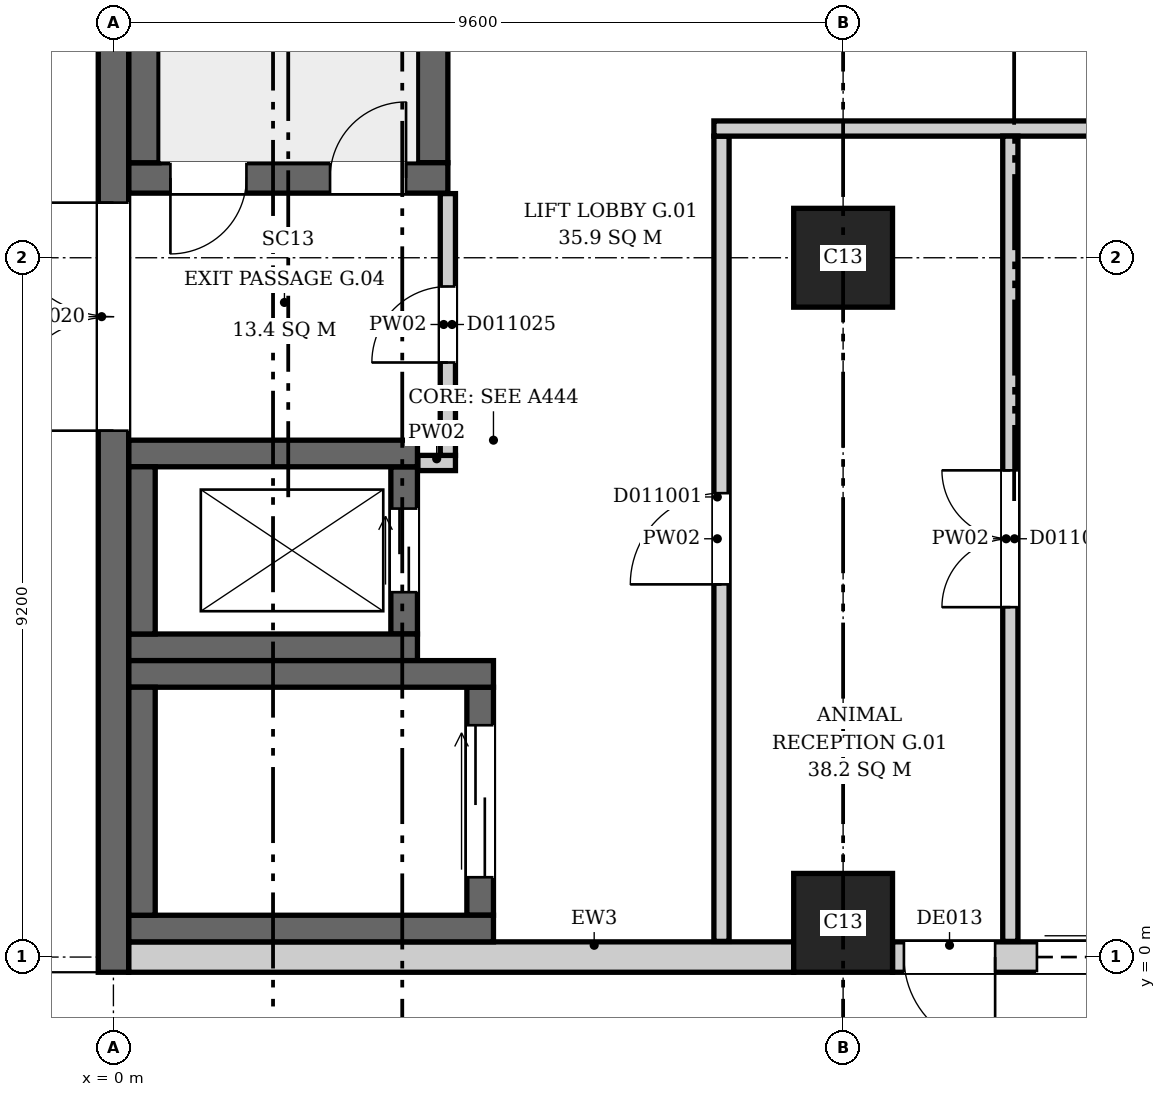
"""IFC4 building model, lengths in metres.
Left out: names, types, materials, properties, quantities, classifications, styles, units other than length and angle.
Written with IfcOpenShell. Run it as: python <this file> out.ifc"""

import sys

from ifc_helpers import new_model, si_unit, direction, frame, frame_2d, origin, origin_2d, place, context, subcontext, project, spatial, rectangle, extrude, element, fill, save


model = new_model("IFC4")
c1 = context("Model", 3, precision=1e-05, world=origin(), true_north=direction((0.0, 1.0)))
c2 = subcontext(c1, "Body", "Model", "MODEL_VIEW")
j1 = project(units=[si_unit("LENGTHUNIT", "METRE"), si_unit("PLANEANGLEUNIT", "RADIAN")], contexts=[c1])
p1 = place(None, origin())
s1 = spatial("IfcSite", under=j1, at=p1, CompositionType="ELEMENT")
p2 = place(p1, origin())
s2 = spatial("IfcBuilding", under=s1, at=p2, CompositionType="ELEMENT")
p3 = place(p2, origin())
s3 = spatial("IfcBuildingStorey", under=s2, at=p3, CompositionType="ELEMENT", Elevation=0.0)
p4 = place(p3, frame((0.0, -0.2, 0.0), z_axis=(0.0, 0.0, 1.0), x_axis=(0.0, 1.0, 0.0)))
e1 = element("IfcWall", 1, at=p4, inside=s3, PredefinedType="SHEAR", context=c2, shape_type="SweptSolid", body=[
    extrude(rectangle(XDim=46.88, YDim=0.4, at=frame_2d((23.44, 0.0))), origin(), (0.0, 0.0, 1.0), 6.5),
])
p5 = place(p4, frame((7.125, 0.0, 0.0)))
e2 = element("IfcOpeningElement", 2, at=p5, cuts=e1, PredefinedType="OPENING", context=c2, shape_type="SweptSolid", body=[
    extrude(rectangle(XDim=3.0, YDim=2.4, at=frame_2d((1.5, 1.2))), frame((0.0, 0.21, 0.0), z_axis=(0.0, -1.0, 0.0), x_axis=(1.0, 0.0, 0.0)), (0.0, 0.0, 1.0), 0.42),
])
p6 = place(p4, frame((38.2, 0.0, 0.0)))
e3 = element("IfcOpeningElement", 3, at=p6, cuts=e1, PredefinedType="OPENING", context=c2, shape_type="SweptSolid", body=[
    extrude(rectangle(XDim=3.0, YDim=2.4, at=frame_2d((1.5, 1.2))), frame((0.0, 0.21, 0.0), z_axis=(0.0, -1.0, 0.0), x_axis=(1.0, 0.0, 0.0)), (0.0, 0.0, 1.0), 0.42),
])
p7 = place(p3, frame((0.2, 10.25, 0.0), z_axis=(0.0, 0.0, 1.0), x_axis=(1.0, 0.0, 0.0)))
e4 = element("IfcWall", 4, at=p7, inside=s3, PredefinedType="SHEAR", context=c2, shape_type="SweptSolid", body=[
    extrude(rectangle(XDim=4.2, YDim=0.4, at=frame_2d((2.1, 0.0))), origin(), (0.0, 0.0, 1.0), 6.5),
])
p8 = place(p7, frame((0.55, 0.0, 0.0)))
e5 = element("IfcOpeningElement", 5, at=p8, cuts=e4, PredefinedType="OPENING", context=c2, shape_type="SweptSolid", body=[
    extrude(rectangle(XDim=1.0, YDim=2.1, at=frame_2d((0.5, 1.05))), frame((0.0, 0.21, 0.0), z_axis=(0.0, -1.0, 0.0), x_axis=(1.0, 0.0, 0.0)), (0.0, 0.0, 1.0), 0.42),
])
p9 = place(p7, frame((2.65, 0.0, 0.0)))
e6 = element("IfcOpeningElement", 6, at=p9, cuts=e4, PredefinedType="OPENING", context=c2, shape_type="SweptSolid", body=[
    extrude(rectangle(XDim=1.0, YDim=2.1, at=frame_2d((0.5, 1.05))), frame((0.0, 0.21, 0.0), z_axis=(0.0, -1.0, 0.0), x_axis=(1.0, 0.0, 0.0)), (0.0, 0.0, 1.0), 0.42),
])
for number, where, z_axis, x_axis in (
    (7, (0.4, 10.45, 0.0), (0.0, 0.0, 1.0), (0.0, 1.0, 0.0)),
    (8, (4.2, 10.45, 0.0), (0.0, 0.0, 1.0), (0.0, 1.0, 0.0)),
):
    element("IfcWall", number, at=place(p3, frame(where, z_axis=z_axis, x_axis=x_axis)), inside=s3, PredefinedType="SHEAR", context=c2, shape_type="SweptSolid", body=[
        extrude(rectangle(XDim=6.6, YDim=0.4, at=frame_2d((3.3, 0.0))), origin(), (0.0, 0.0, 1.0), 6.5),
    ])
for number, where, z_axis, x_axis in (
    (9, (0.2, 0.375, 0.0), (0.0, 0.0, 1.0), (1.0, 0.0, 0.0)),
    (10, (0.2, 3.725, 0.0), (0.0, 0.0, 1.0), (1.0, 0.0, 0.0)),
):
    element("IfcWall", number, at=place(p3, frame(where, z_axis=z_axis, x_axis=x_axis)), inside=s3, PredefinedType="SHEAR", context=c2, shape_type="SweptSolid", body=[
        extrude(rectangle(XDim=4.8, YDim=0.35, at=frame_2d((2.4, 0.0))), origin(), (0.0, 0.0, 1.0), 6.5),
    ])
p10 = place(p3, frame((0.375, 0.55, 0.0), z_axis=(0.0, 0.0, 1.0), x_axis=(0.0, 1.0, 0.0)))
e11 = element("IfcWall", 11, at=p10, inside=s3, PredefinedType="SHEAR", context=c2, shape_type="SweptSolid", body=[
    extrude(rectangle(XDim=3.0, YDim=0.35, at=frame_2d((1.5, 0.0))), origin(), (0.0, 0.0, 1.0), 6.5),
])
p11 = place(p3, frame((4.825, 0.55, 0.0), z_axis=(0.0, 0.0, 1.0), x_axis=(0.0, 1.0, 0.0)))
e12 = element("IfcWall", 12, at=p11, inside=s3, PredefinedType="SHEAR", context=c2, shape_type="SweptSolid", body=[
    extrude(rectangle(XDim=3.0, YDim=0.35, at=frame_2d((1.5, 0.0))), origin(), (0.0, 0.0, 1.0), 6.5),
])
p12 = place(p11, frame((0.5, 0.0, 0.0)))
e13 = element("IfcOpeningElement", 13, at=p12, cuts=e12, PredefinedType="OPENING", context=c2, shape_type="SweptSolid", body=[
    extrude(rectangle(XDim=2.0, YDim=2.4, at=frame_2d((1.0, 1.2))), frame((0.0, 0.185, 0.0), z_axis=(0.0, -1.0, 0.0), x_axis=(1.0, 0.0, 0.0)), (0.0, 0.0, 1.0), 0.37),
])
for number, where, z_axis, x_axis in (
    (14, (0.2, 4.075, 0.0), (0.0, 0.0, 1.0), (1.0, 0.0, 0.0)),
    (15, (0.2, 6.625, 0.0), (0.0, 0.0, 1.0), (1.0, 0.0, 0.0)),
):
    element("IfcWall", number, at=place(p3, frame(where, z_axis=z_axis, x_axis=x_axis)), inside=s3, PredefinedType="SHEAR", context=c2, shape_type="SweptSolid", body=[
        extrude(rectangle(XDim=3.8, YDim=0.35, at=frame_2d((1.9, 0.0))), origin(), (0.0, 0.0, 1.0), 6.5),
    ])
p13 = place(p3, frame((0.375, 4.25, 0.0), z_axis=(0.0, 0.0, 1.0), x_axis=(0.0, 1.0, 0.0)))
e16 = element("IfcWall", 16, at=p13, inside=s3, PredefinedType="SHEAR", context=c2, shape_type="SweptSolid", body=[
    extrude(rectangle(XDim=2.2, YDim=0.35, at=frame_2d((1.1, 0.0))), origin(), (0.0, 0.0, 1.0), 6.5),
])
p14 = place(p3, frame((3.825, 4.25, 0.0), z_axis=(0.0, 0.0, 1.0), x_axis=(0.0, 1.0, 0.0)))
e17 = element("IfcWall", 17, at=p14, inside=s3, PredefinedType="SHEAR", context=c2, shape_type="SweptSolid", body=[
    extrude(rectangle(XDim=2.2, YDim=0.35, at=frame_2d((1.1, 0.0))), origin(), (0.0, 0.0, 1.0), 6.5),
])
p15 = place(p14, frame((0.55, 0.0, 0.0)))
e18 = element("IfcOpeningElement", 18, at=p15, cuts=e17, PredefinedType="OPENING", context=c2, shape_type="SweptSolid", body=[
    extrude(rectangle(XDim=1.1, YDim=2.1, at=frame_2d((0.55, 1.05))), frame((0.0, 0.185, 0.0), z_axis=(0.0, -1.0, 0.0), x_axis=(1.0, 0.0, 0.0)), (0.0, 0.0, 1.0), 0.37),
])
for number, where, z_axis, x_axis in (
    (19, (9.6, 0.45, 0.0), (0.0, 0.0, 1.0), (1.0, 0.0, 0.0)),
    (20, (9.6, 9.2, 0.0), (0.0, 0.0, 1.0), (1.0, 0.0, 0.0)),
):
    element("IfcColumn", number, at=place(p3, frame(where, z_axis=z_axis, x_axis=x_axis)), inside=s3, PredefinedType="COLUMN", context=c2, shape_type="SweptSolid", body=[
        extrude(rectangle(XDim=1.3, YDim=1.3, at=origin_2d()), origin(), (0.0, 0.0, 1.0), 6.5),
    ])
p16 = place(p3, frame((0.2, 0.0, 0.0), z_axis=(0.0, 0.0, 1.0), x_axis=(1.0, 0.0, 0.0)))
e21 = element("IfcWall", 21, at=p16, inside=s3, PredefinedType="ELEMENTEDWALL", context=c2, shape_type="SweptSolid", body=[
    extrude(rectangle(XDim=8.75, YDim=0.4, at=frame_2d((4.375, 0.0))), origin(), (0.0, 0.0, 1.0), 6.15),
])
p17 = place(p3, frame((10.25, 0.0, 0.0), z_axis=(0.0, 0.0, 1.0), x_axis=(1.0, 0.0, 0.0)))
e22 = element("IfcWall", 22, at=p17, inside=s3, PredefinedType="ELEMENTEDWALL", context=c2, shape_type="SweptSolid", body=[
    extrude(rectangle(XDim=8.3, YDim=0.4, at=frame_2d((4.15, 0.0))), origin(), (0.0, 0.0, 1.0), 6.15),
])
p18 = place(p17, frame((0.15, 0.0, 0.0)))
e23 = element("IfcOpeningElement", 23, at=p18, cuts=e22, PredefinedType="OPENING", context=c2, shape_type="SweptSolid", body=[
    extrude(rectangle(XDim=1.2, YDim=2.4, at=frame_2d((0.6, 1.2))), frame((0.0, 0.21, 0.0), z_axis=(0.0, -1.0, 0.0), x_axis=(1.0, 0.0, 0.0)), (0.0, 0.0, 1.0), 0.42),
])
p19 = place(p17, frame((1.9, 0.0, 0.0)))
e24 = element("IfcOpeningElement", 24, at=p19, cuts=e22, PredefinedType="OPENING", context=c2, shape_type="SweptSolid", body=[
    extrude(rectangle(XDim=4.5, YDim=4.5, at=frame_2d((2.25, 2.25))), frame((0.0, 0.21, 0.0), z_axis=(0.0, -1.0, 0.0), x_axis=(1.0, 0.0, 0.0)), (0.0, 0.0, 1.0), 0.42),
])
p20 = place(p17, frame((6.9, 0.0, 0.0)))
e25 = element("IfcOpeningElement", 25, at=p20, cuts=e22, PredefinedType="OPENING", context=c2, shape_type="SweptSolid", body=[
    extrude(rectangle(XDim=0.9, YDim=2.1, at=frame_2d((0.45, 1.05))), frame((0.0, 0.21, 0.0), z_axis=(0.0, -1.0, 0.0), x_axis=(1.0, 0.0, 0.0)), (0.0, 0.0, 1.0), 0.42),
])
p21 = place(p3, frame((4.006, 6.5, 0.0), z_axis=(0.0, 0.0, 1.0), x_axis=(1.0, 0.0, 0.0)))
e26 = element("IfcWall", 26, at=p21, inside=s3, PredefinedType="PARTITIONING", context=c2, shape_type="SweptSolid", body=[
    extrude(rectangle(XDim=0.494, YDim=0.2, at=frame_2d((0.247, 0.0))), origin(), (0.0, 0.0, 1.0), 6.15),
])
p22 = place(p3, frame((4.4, 6.6, 0.0), z_axis=(0.0, 0.0, 1.0), x_axis=(0.0, 1.0, 0.0)))
e27 = element("IfcWall", 27, at=p22, inside=s3, PredefinedType="PARTITIONING", context=c2, shape_type="SweptSolid", body=[
    extrude(rectangle(XDim=3.444, YDim=0.2, at=frame_2d((1.722, 0.0))), origin(), (0.0, 0.0, 1.0), 6.15),
])
p23 = place(p22, frame((1.222, 0.0, 0.0)))
e28 = element("IfcOpeningElement", 28, at=p23, cuts=e27, PredefinedType="OPENING", context=c2, shape_type="SweptSolid", body=[
    extrude(rectangle(XDim=1.0, YDim=2.1, at=frame_2d((0.5, 1.05))), frame((0.0, 0.11, 0.0), z_axis=(0.0, -1.0, 0.0), x_axis=(1.0, 0.0, 0.0)), (0.0, 0.0, 1.0), 0.22),
])
p24 = place(p3, frame((8.0, 0.206, 0.0), z_axis=(0.0, 0.0, 1.0), x_axis=(0.0, 1.0, 0.0)))
e29 = element("IfcWall", 29, at=p24, inside=s3, PredefinedType="PARTITIONING", context=c2, shape_type="SweptSolid", body=[
    extrude(rectangle(XDim=10.594, YDim=0.2, at=frame_2d((5.297, 0.0))), origin(), (0.0, 0.0, 1.0), 6.15),
])
p25 = place(p24, frame((4.697, 0.0, 0.0)))
e30 = element("IfcOpeningElement", 30, at=p25, cuts=e29, PredefinedType="OPENING", context=c2, shape_type="SweptSolid", body=[
    extrude(rectangle(XDim=1.2, YDim=2.1, at=frame_2d((0.6, 1.05))), frame((0.0, 0.11, 0.0), z_axis=(0.0, -1.0, 0.0), x_axis=(1.0, 0.0, 0.0)), (0.0, 0.0, 1.0), 0.22),
])
p26 = place(p3, frame((7.9, 10.9, 0.0), z_axis=(0.0, 0.0, 1.0), x_axis=(1.0, 0.0, 0.0)))
e31 = element("IfcWall", 31, at=p26, inside=s3, PredefinedType="PARTITIONING", context=c2, shape_type="SweptSolid", body=[
    extrude(rectangle(XDim=49.494, YDim=0.2, at=frame_2d((24.747, 0.0))), origin(), (0.0, 0.0, 1.0), 6.15),
])
p27 = place(p26, frame((41.3, 0.0, 0.0)))
e32 = element("IfcOpeningElement", 32, at=p27, cuts=e31, PredefinedType="OPENING", context=c2, shape_type="SweptSolid", body=[
    extrude(rectangle(XDim=1.2, YDim=2.1, at=frame_2d((0.6, 1.05))), frame((0.0, 0.11, 0.0), z_axis=(0.0, -1.0, 0.0), x_axis=(1.0, 0.0, 0.0)), (0.0, 0.0, 1.0), 0.22),
])
p28 = place(p3, frame((11.8, 0.206, 0.0), z_axis=(0.0, 0.0, 1.0), x_axis=(0.0, 1.0, 0.0)))
e33 = element("IfcWall", 33, at=p28, inside=s3, PredefinedType="PARTITIONING", context=c2, shape_type="SweptSolid", body=[
    extrude(rectangle(XDim=10.594, YDim=0.2, at=frame_2d((5.297, 0.0))), origin(), (0.0, 0.0, 1.0), 6.15),
])
p29 = place(p28, frame((4.397, 0.0, 0.0)))
e34 = element("IfcOpeningElement", 34, at=p29, cuts=e33, PredefinedType="OPENING", context=c2, shape_type="SweptSolid", body=[
    extrude(rectangle(XDim=1.8, YDim=2.1, at=frame_2d((0.9, 1.05))), frame((0.0, 0.11, 0.0), z_axis=(0.0, -1.0, 0.0), x_axis=(1.0, 0.0, 0.0)), (0.0, 0.0, 1.0), 0.22),
])
p30 = place(p18, frame((1.2, 0.0, 0.0), z_axis=(0.0, 0.0, 1.0), x_axis=(-1.0, 0.0, 0.0)))
e35 = element("IfcDoor", 35, at=p30, inside=s3, OperationType="SINGLE_SWING_RIGHT", PredefinedType="DOOR", context=c2, shape_type="SweptSolid", body=[
    extrude(rectangle(XDim=1.2, YDim=2.4, at=frame_2d((0.6, 1.2))), frame((0.0, 0.025, 0.0), z_axis=(0.0, -1.0, 0.0), x_axis=(1.0, 0.0, 0.0)), (0.0, 0.0, 1.0), 0.05),
])
fill(e23, e35)
p31 = place(p19, frame((4.5, 0.0, 0.0), z_axis=(0.0, 0.0, 1.0), x_axis=(-1.0, 0.0, 0.0)))
e36 = element("IfcDoor", 36, at=p31, inside=s3, OperationType="ROLLINGUP", PredefinedType="GATE", context=c2, shape_type="SweptSolid", body=[
    extrude(rectangle(XDim=4.5, YDim=4.5, at=frame_2d((2.25, 2.25))), frame((0.0, 0.025, 0.0), z_axis=(0.0, -1.0, 0.0), x_axis=(1.0, 0.0, 0.0)), (0.0, 0.0, 1.0), 0.05),
])
fill(e24, e36)
p32 = place(p5, origin())
e37 = element("IfcDoor", 37, at=p32, inside=s3, OperationType="DOUBLE_DOOR_SINGLE_SWING", PredefinedType="DOOR", context=c2, shape_type="SweptSolid", body=[
    extrude(rectangle(XDim=3.0, YDim=2.4, at=frame_2d((1.5, 1.2))), frame((0.0, 0.025, 0.0), z_axis=(0.0, -1.0, 0.0), x_axis=(1.0, 0.0, 0.0)), (0.0, 0.0, 1.0), 0.05),
])
fill(e2, e37)
p33 = place(p8, origin())
e38 = element("IfcDoor", 38, at=p33, inside=s3, OperationType="SINGLE_SWING_LEFT", PredefinedType="DOOR", context=c2, shape_type="SweptSolid", body=[
    extrude(rectangle(XDim=1.0, YDim=2.1, at=frame_2d((0.5, 1.05))), frame((0.0, 0.025, 0.0), z_axis=(0.0, -1.0, 0.0), x_axis=(1.0, 0.0, 0.0)), (0.0, 0.0, 1.0), 0.05),
])
fill(e5, e38)
p34 = place(p9, origin())
e39 = element("IfcDoor", 39, at=p34, inside=s3, OperationType="SINGLE_SWING_RIGHT", PredefinedType="DOOR", context=c2, shape_type="SweptSolid", body=[
    extrude(rectangle(XDim=1.0, YDim=2.1, at=frame_2d((0.5, 1.05))), frame((0.0, 0.025, 0.0), z_axis=(0.0, -1.0, 0.0), x_axis=(1.0, 0.0, 0.0)), (0.0, 0.0, 1.0), 0.05),
])
fill(e6, e39)
p35 = place(p12, origin())
e40 = element("IfcDoor", 40, at=p35, inside=s3, OperationType="DOUBLE_DOOR_SLIDING", PredefinedType="DOOR", context=c2, shape_type="SweptSolid", body=[
    extrude(rectangle(XDim=2.0, YDim=2.4, at=frame_2d((1.0, 1.2))), frame((0.0, 0.025, 0.0), z_axis=(0.0, -1.0, 0.0), x_axis=(1.0, 0.0, 0.0)), (0.0, 0.0, 1.0), 0.05),
])
fill(e13, e40)
p36 = place(p15, origin())
e41 = element("IfcDoor", 41, at=p36, inside=s3, OperationType="DOUBLE_DOOR_SLIDING", PredefinedType="DOOR", context=c2, shape_type="SweptSolid", body=[
    extrude(rectangle(XDim=1.1, YDim=2.1, at=frame_2d((0.55, 1.05))), frame((0.0, 0.025, 0.0), z_axis=(0.0, -1.0, 0.0), x_axis=(1.0, 0.0, 0.0)), (0.0, 0.0, 1.0), 0.05),
])
fill(e18, e41)
p37 = place(p25, origin())
e42 = element("IfcDoor", 42, at=p37, inside=s3, OperationType="SINGLE_SWING_LEFT", PredefinedType="DOOR", context=c2, shape_type="SweptSolid", body=[
    extrude(rectangle(XDim=1.2, YDim=2.1, at=frame_2d((0.6, 1.05))), frame((0.0, 0.025, 0.0), z_axis=(0.0, -1.0, 0.0), x_axis=(1.0, 0.0, 0.0)), (0.0, 0.0, 1.0), 0.05),
])
fill(e30, e42)
p38 = place(p29, origin())
e43 = element("IfcDoor", 43, at=p38, inside=s3, OperationType="DOUBLE_DOOR_SINGLE_SWING", PredefinedType="DOOR", context=c2, shape_type="SweptSolid", body=[
    extrude(rectangle(XDim=1.8, YDim=2.1, at=frame_2d((0.9, 1.05))), frame((0.0, 0.025, 0.0), z_axis=(0.0, -1.0, 0.0), x_axis=(1.0, 0.0, 0.0)), (0.0, 0.0, 1.0), 0.05),
])
fill(e34, e43)
p39 = place(p23, origin())
e44 = element("IfcDoor", 44, at=p39, inside=s3, OperationType="SINGLE_SWING_LEFT", PredefinedType="DOOR", context=c2, shape_type="SweptSolid", body=[
    extrude(rectangle(XDim=1.0, YDim=2.1, at=frame_2d((0.5, 1.05))), frame((0.0, 0.025, 0.0), z_axis=(0.0, -1.0, 0.0), x_axis=(1.0, 0.0, 0.0)), (0.0, 0.0, 1.0), 0.05),
])
fill(e28, e44)
save(model, sys.argv[1])
